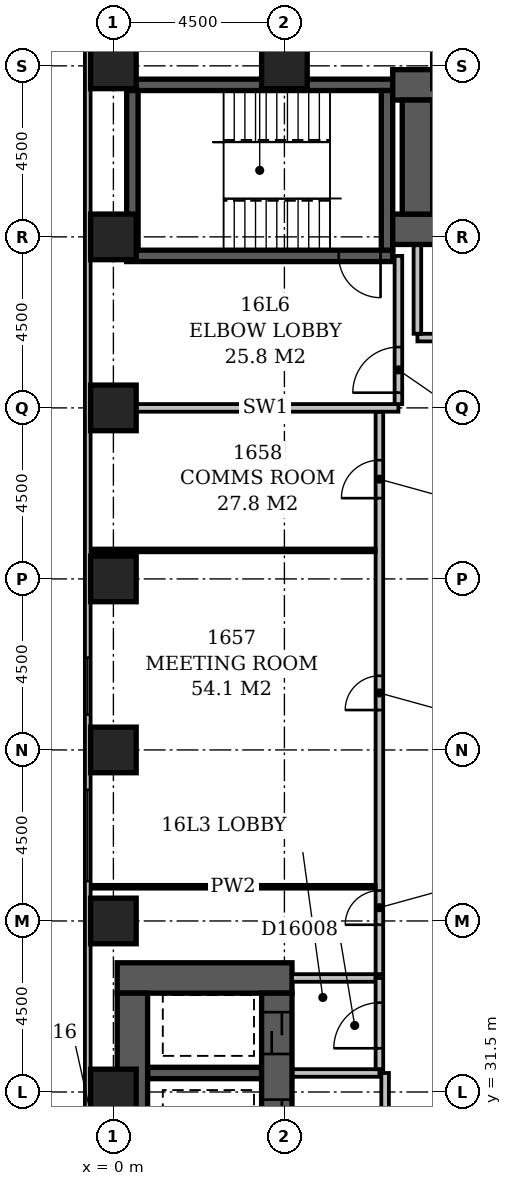
"""IFC4 building model, lengths in metres.
Left out: names, types, materials, properties, quantities, classifications, styles, units other than length and angle.
Written with IfcOpenShell. Run it as: python <this file> out.ifc"""

import sys

from ifc_helpers import new_model, si_unit, direction, frame, frame_2d, origin, origin_2d, place, context, subcontext, project, spatial, rectangle, extrude, element, fill, save


model = new_model("IFC4")
c1 = context("Model", 3, precision=1e-05, world=origin(), true_north=direction((0.0, 1.0)))
c2 = subcontext(c1, "Body", "Model", "MODEL_VIEW")
j1 = project(units=[si_unit("LENGTHUNIT", "METRE"), si_unit("PLANEANGLEUNIT", "RADIAN")], contexts=[c1])
p1 = place(None, origin())
s1 = spatial("IfcSite", under=j1, at=p1, CompositionType="ELEMENT")
p2 = place(p1, origin())
s2 = spatial("IfcBuilding", under=s1, at=p2, CompositionType="ELEMENT")
p3 = place(p2, frame((0.0, 0.0, 68.6)))
s3 = spatial("IfcBuildingStorey", under=s2, at=p3, CompositionType="ELEMENT", Elevation=68.6)
p4 = place(p3, frame((0.1, 34.5, -0.3), z_axis=(0.0, 0.0, 1.0), x_axis=(1.0, 0.0, 0.0)))
e1 = element("IfcWall", 1, at=p4, inside=s3, PredefinedType="SHEAR", context=c2, shape_type="SweptSolid", body=[
    extrude(rectangle(XDim=4.6, YDim=0.8, at=frame_2d((2.3, 0.0))), origin(), (0.0, 0.0, 1.0), 3.6),
])
p5 = place(p3, frame((0.35, 53.5, -0.3), z_axis=(0.0, 0.0, 1.0), x_axis=(1.0, 0.0, 0.0)))
e2 = element("IfcWall", 2, at=p5, inside=s3, PredefinedType="SHEAR", context=c2, shape_type="SweptSolid", body=[
    extrude(rectangle(XDim=7.0, YDim=0.3, at=frame_2d((3.5, 0.0))), origin(), (0.0, 0.0, 1.0), 3.6),
])
p6 = place(p5, frame((5.58, 0.0, 0.3)))
e3 = element("IfcOpeningElement", 3, at=p6, cuts=e2, PredefinedType="OPENING", context=c2, shape_type="SweptSolid", body=[
    extrude(rectangle(XDim=1.1, YDim=2.1, at=frame_2d((0.55, 1.05))), frame((0.0, 0.162, 0.0), z_axis=(0.0, -1.0, 0.0), x_axis=(1.0, 0.0, 0.0)), (0.0, 0.0, 1.0), 0.324),
])
p7 = place(p3, frame((0.35, 58.0, -0.3), z_axis=(0.0, 0.0, 1.0), x_axis=(1.0, 0.0, 0.0)))
e4 = element("IfcWall", 4, at=p7, inside=s3, PredefinedType="SHEAR", context=c2, shape_type="SweptSolid", body=[
    extrude(rectangle(XDim=7.0, YDim=0.3, at=frame_2d((3.5, 0.0))), origin(), (0.0, 0.0, 1.0), 3.6),
])
p8 = place(p3, frame((0.5, 27.15, -0.3), z_axis=(0.0, 0.0, 1.0), x_axis=(0.0, 1.0, 0.0)))
e5 = element("IfcWall", 5, at=p8, inside=s3, PredefinedType="SHEAR", context=c2, shape_type="SweptSolid", body=[
    extrude(rectangle(XDim=6.95, YDim=0.8, at=frame_2d((3.475, 0.0))), origin(), (0.0, 0.0, 1.0), 3.6),
])
p9 = place(p3, frame((0.5, 53.65, -0.3), z_axis=(0.0, 0.0, 1.0), x_axis=(0.0, 1.0, 0.0)))
e6 = element("IfcWall", 6, at=p9, inside=s3, PredefinedType="SHEAR", context=c2, shape_type="SweptSolid", body=[
    extrude(rectangle(XDim=4.2, YDim=0.3, at=frame_2d((2.1, 0.0))), origin(), (0.0, 0.0, 1.0), 3.6),
])
p10 = place(p3, frame((0.9, 32.0, -0.3), z_axis=(0.0, 0.0, 1.0), x_axis=(1.0, 0.0, 0.0)))
e7 = element("IfcWall", 7, at=p10, inside=s3, PredefinedType="SHEAR", context=c2, shape_type="SweptSolid", body=[
    extrude(rectangle(XDim=3.0, YDim=0.3, at=frame_2d((1.5, 0.0))), origin(), (0.0, 0.0, 1.0), 3.6),
])
p11 = place(p3, frame((4.3, 27.15, -0.3), z_axis=(0.0, 0.0, 1.0), x_axis=(0.0, 1.0, 0.0)))
e8 = element("IfcWall", 8, at=p11, inside=s3, PredefinedType="SHEAR", context=c2, shape_type="SweptSolid", body=[
    extrude(rectangle(XDim=6.95, YDim=0.8, at=frame_2d((3.475, 0.0))), origin(), (0.0, 0.0, 1.0), 3.6),
])
p12 = place(p11, frame((3.05, 0.0, 0.3)))
e9 = element("IfcOpeningElement", 9, at=p12, cuts=e8, PredefinedType="OPENING", context=c2, shape_type="SweptSolid", body=[
    extrude(rectangle(XDim=1.1, YDim=2.1, at=frame_2d((0.55, 1.05))), frame((0.0, 0.412, 0.0), z_axis=(0.0, -1.0, 0.0), x_axis=(1.0, 0.0, 0.0)), (0.0, 0.0, 1.0), 0.824),
])
p13 = place(p11, frame((0.55, 0.0, 0.3)))
e10 = element("IfcOpeningElement", 10, at=p13, cuts=e8, PredefinedType="OPENING", context=c2, shape_type="SweptSolid", body=[
    extrude(rectangle(XDim=1.1, YDim=2.1, at=frame_2d((0.55, 1.05))), frame((0.0, 0.412, 0.0), z_axis=(0.0, -1.0, 0.0), x_axis=(1.0, 0.0, 0.0)), (0.0, 0.0, 1.0), 0.824),
])
p14 = place(p11, frame((5.35, 0.0, 0.3)))
e11 = element("IfcOpeningElement", 11, at=p14, cuts=e8, PredefinedType="OPENING", context=c2, shape_type="SweptSolid", body=[
    extrude(rectangle(XDim=1.1, YDim=2.1, at=frame_2d((0.55, 1.05))), frame((0.0, 0.412, 0.0), z_axis=(0.0, -1.0, 0.0), x_axis=(1.0, 0.0, 0.0)), (0.0, 0.0, 1.0), 0.824),
])
p15 = place(p3, frame((7.2, 53.65, -0.3), z_axis=(0.0, 0.0, 1.0), x_axis=(0.0, 1.0, 0.0)))
e12 = element("IfcWall", 12, at=p15, inside=s3, PredefinedType="SHEAR", context=c2, shape_type="SweptSolid", body=[
    extrude(rectangle(XDim=4.2, YDim=0.3, at=frame_2d((2.1, 0.0))), origin(), (0.0, 0.0, 1.0), 3.6),
])
p16 = place(p3, frame((7.35, 54.2, -0.3), z_axis=(0.0, 0.0, 1.0), x_axis=(1.0, 0.0, 0.0)))
e13 = element("IfcWall", 13, at=p16, inside=s3, PredefinedType="SHEAR", context=c2, shape_type="SweptSolid", body=[
    extrude(rectangle(XDim=16.45, YDim=0.8, at=frame_2d((8.225, 0.0))), origin(), (0.0, 0.0, 1.0), 3.6),
])
p17 = place(p16, frame((1.35, 0.0, 0.3)))
e14 = element("IfcOpeningElement", 14, at=p17, cuts=e13, PredefinedType="OPENING", context=c2, shape_type="SweptSolid", body=[
    extrude(rectangle(XDim=1.1, YDim=2.1, at=frame_2d((0.55, 1.05))), frame((0.0, 0.412, 0.0), z_axis=(0.0, -1.0, 0.0), x_axis=(1.0, 0.0, 0.0)), (0.0, 0.0, 1.0), 0.824),
])
p18 = place(p16, frame((3.85, 0.0, 0.3)))
e15 = element("IfcOpeningElement", 15, at=p18, cuts=e13, PredefinedType="OPENING", context=c2, shape_type="SweptSolid", body=[
    extrude(rectangle(XDim=1.1, YDim=2.1, at=frame_2d((0.55, 1.05))), frame((0.0, 0.412, 0.0), z_axis=(0.0, -1.0, 0.0), x_axis=(1.0, 0.0, 0.0)), (0.0, 0.0, 1.0), 0.824),
])
p19 = place(p16, frame((6.35, 0.0, 0.3)))
e16 = element("IfcOpeningElement", 16, at=p19, cuts=e13, PredefinedType="OPENING", context=c2, shape_type="SweptSolid", body=[
    extrude(rectangle(XDim=1.1, YDim=2.1, at=frame_2d((0.55, 1.05))), frame((0.0, 0.412, 0.0), z_axis=(0.0, -1.0, 0.0), x_axis=(1.0, 0.0, 0.0)), (0.0, 0.0, 1.0), 0.824),
])
p20 = place(p16, frame((8.85, 0.0, 0.3)))
e17 = element("IfcOpeningElement", 17, at=p20, cuts=e13, PredefinedType="OPENING", context=c2, shape_type="SweptSolid", body=[
    extrude(rectangle(XDim=1.1, YDim=2.1, at=frame_2d((0.55, 1.05))), frame((0.0, 0.412, 0.0), z_axis=(0.0, -1.0, 0.0), x_axis=(1.0, 0.0, 0.0)), (0.0, 0.0, 1.0), 0.824),
])
p21 = place(p16, frame((11.35, 0.0, 0.3)))
e18 = element("IfcOpeningElement", 18, at=p21, cuts=e13, PredefinedType="OPENING", context=c2, shape_type="SweptSolid", body=[
    extrude(rectangle(XDim=1.1, YDim=2.1, at=frame_2d((0.55, 1.05))), frame((0.0, 0.412, 0.0), z_axis=(0.0, -1.0, 0.0), x_axis=(1.0, 0.0, 0.0)), (0.0, 0.0, 1.0), 0.824),
])
p22 = place(p16, frame((13.85, 0.0, 0.3)))
e19 = element("IfcOpeningElement", 19, at=p22, cuts=e13, PredefinedType="OPENING", context=c2, shape_type="SweptSolid", body=[
    extrude(rectangle(XDim=1.1, YDim=2.1, at=frame_2d((0.55, 1.05))), frame((0.0, 0.412, 0.0), z_axis=(0.0, -1.0, 0.0), x_axis=(1.0, 0.0, 0.0)), (0.0, 0.0, 1.0), 0.824),
])
p23 = place(p3, frame((7.35, 58.0, -0.3), z_axis=(0.0, 0.0, 1.0), x_axis=(1.0, 0.0, 0.0)))
e20 = element("IfcWall", 20, at=p23, inside=s3, PredefinedType="SHEAR", context=c2, shape_type="SweptSolid", body=[
    extrude(rectangle(XDim=16.45, YDim=0.8, at=frame_2d((8.225, 0.0))), origin(), (0.0, 0.0, 1.0), 3.6),
])
p24 = place(p3, frame((8.0, 54.6, -0.3), z_axis=(0.0, 0.0, 1.0), x_axis=(0.0, 1.0, 0.0)))
e21 = element("IfcWall", 21, at=p24, inside=s3, PredefinedType="SHEAR", context=c2, shape_type="SweptSolid", body=[
    extrude(rectangle(XDim=3.0, YDim=0.8, at=frame_2d((1.5, 0.0))), origin(), (0.0, 0.0, 1.0), 3.6),
])
for number, where, z_axis, x_axis in (
    (22, (0.0, 31.5, -0.3), (0.0, 0.0, 1.0), (1.0, 0.0, 0.0)),
    (23, (0.0, 36.0, -0.3), (0.0, 0.0, 1.0), (1.0, 0.0, 0.0)),
    (24, (0.0, 40.5, -0.3), (0.0, 0.0, 1.0), (1.0, 0.0, 0.0)),
    (25, (0.0, 45.0, -0.3), (0.0, 0.0, 1.0), (1.0, 0.0, 0.0)),
    (26, (0.0, 49.5, -0.3), (0.0, 0.0, 1.0), (1.0, 0.0, 0.0)),
    (27, (0.0, 54.0, -0.3), (0.0, 0.0, 1.0), (1.0, 0.0, 0.0)),
    (28, (0.0, 58.5, -0.3), (0.0, 0.0, 1.0), (1.0, 0.0, 0.0)),
    (29, (4.5, 58.5, -0.3), (0.0, 0.0, 1.0), (1.0, 0.0, 0.0)),
):
    element("IfcColumn", number, at=place(p3, frame(where, z_axis=z_axis, x_axis=x_axis)), inside=s3, PredefinedType="COLUMN", context=c2, shape_type="SweptSolid", body=[
        extrude(rectangle(XDim=1.2, YDim=1.2, at=origin_2d()), origin(), (0.0, 0.0, 1.0), 3.6),
    ])
p25 = place(p3, frame((-0.675, 59.1, 0.0), z_axis=(0.0, 0.0, 1.0), x_axis=(0.0, -1.0, 0.0)))
e30 = element("IfcWall", 30, at=p25, inside=s3, PredefinedType="STANDARD", context=c2, shape_type="SweptSolid", body=[
    extrude(rectangle(XDim=55.35, YDim=0.15, at=frame_2d((27.675, 0.0))), origin(), (0.0, 0.0, 1.0), 2.7),
])
p26 = place(p25, frame((16.17, 0.0, 0.6)))
e31 = element("IfcOpeningElement", 31, at=p26, cuts=e30, PredefinedType="OPENING", context=c2, shape_type="SweptSolid", body=[
    extrude(rectangle(XDim=1.5, YDim=1.8, at=frame_2d((0.75, 0.9))), frame((0.0, 0.087, 0.0), z_axis=(0.0, -1.0, 0.0), x_axis=(1.0, 0.0, 0.0)), (0.0, 0.0, 1.0), 0.174),
])
p27 = place(p25, frame((19.65, 0.0, 0.6)))
e32 = element("IfcOpeningElement", 32, at=p27, cuts=e30, PredefinedType="OPENING", context=c2, shape_type="SweptSolid", body=[
    extrude(rectangle(XDim=2.4, YDim=1.8, at=frame_2d((1.2, 0.9))), frame((0.0, 0.087, 0.0), z_axis=(0.0, -1.0, 0.0), x_axis=(1.0, 0.0, 0.0)), (0.0, 0.0, 1.0), 0.174),
])
p28 = place(p25, frame((43.17, 0.0, 0.6)))
e33 = element("IfcOpeningElement", 33, at=p28, cuts=e30, PredefinedType="OPENING", context=c2, shape_type="SweptSolid", body=[
    extrude(rectangle(XDim=1.5, YDim=1.8, at=frame_2d((0.75, 0.9))), frame((0.0, 0.087, 0.0), z_axis=(0.0, -1.0, 0.0), x_axis=(1.0, 0.0, 0.0)), (0.0, 0.0, 1.0), 0.174),
])
p29 = place(p3, frame((8.0, 51.35, 0.0), z_axis=(0.0, 0.0, 1.0), x_axis=(1.0, 0.0, 0.0)))
e34 = element("IfcWall", 34, at=p29, inside=s3, PredefinedType="PARTITIONING", context=c2, shape_type="SweptSolid", body=[
    extrude(rectangle(XDim=15.0, YDim=0.2, at=frame_2d((7.5, 0.0))), origin(), (0.0, 0.0, 1.0), 3.3),
])
p30 = place(p29, frame((3.4, 0.0, 0.0)))
e35 = element("IfcOpeningElement", 35, at=p30, cuts=e34, PredefinedType="OPENING", context=c2, shape_type="SweptSolid", body=[
    extrude(rectangle(XDim=1.2, YDim=2.1, at=frame_2d((0.6, 1.05))), frame((0.0, 0.112, 0.0), z_axis=(0.0, -1.0, 0.0), x_axis=(1.0, 0.0, 0.0)), (0.0, 0.0, 1.0), 0.224),
])
p31 = place(p29, frame((9.4, 0.0, 0.0)))
e36 = element("IfcOpeningElement", 36, at=p31, cuts=e34, PredefinedType="OPENING", context=c2, shape_type="SweptSolid", body=[
    extrude(rectangle(XDim=1.2, YDim=2.1, at=frame_2d((0.6, 1.05))), frame((0.0, 0.112, 0.0), z_axis=(0.0, -1.0, 0.0), x_axis=(1.0, 0.0, 0.0)), (0.0, 0.0, 1.0), 0.224),
])
p32 = place(p3, frame((8.0, 51.45, 0.0), z_axis=(0.0, 0.0, 1.0), x_axis=(0.0, 1.0, 0.0)))
e37 = element("IfcWall", 37, at=p32, inside=s3, PredefinedType="PARTITIONING", context=c2, shape_type="SweptSolid", body=[
    extrude(rectangle(XDim=2.33, YDim=0.2, at=frame_2d((1.165, 0.0))), origin(), (0.0, 0.0, 1.0), 3.3),
])
p33 = place(p3, frame((4.72, 32.0, 0.0), z_axis=(0.0, 0.0, 1.0), x_axis=(1.0, 0.0, 0.0)))
e38 = element("IfcWall", 38, at=p33, inside=s3, PredefinedType="PARTITIONING", context=c2, shape_type="SweptSolid", body=[
    extrude(rectangle(XDim=2.28, YDim=0.2, at=frame_2d((1.14, 0.0))), origin(), (0.0, 0.0, 1.0), 3.3),
])
p34 = place(p3, frame((7.0, 32.1, 0.0), z_axis=(0.0, 0.0, 1.0), x_axis=(0.0, 1.0, 0.0)))
e39 = element("IfcWall", 39, at=p34, inside=s3, PredefinedType="PARTITIONING", context=c2, shape_type="SweptSolid", body=[
    extrude(rectangle(XDim=2.4, YDim=0.2, at=frame_2d((1.2, 0.0))), origin(), (0.0, 0.0, 1.0), 3.3),
])
p35 = place(p34, frame((0.55, 0.0, 0.0)))
e40 = element("IfcOpeningElement", 40, at=p35, cuts=e39, PredefinedType="OPENING", context=c2, shape_type="SweptSolid", body=[
    extrude(rectangle(XDim=1.2, YDim=2.1, at=frame_2d((0.6, 1.05))), frame((0.0, 0.112, 0.0), z_axis=(0.0, -1.0, 0.0), x_axis=(1.0, 0.0, 0.0)), (0.0, 0.0, 1.0), 0.224),
])
p36 = place(p3, frame((4.7, 34.5, 0.0), z_axis=(0.0, 0.0, 1.0), x_axis=(1.0, 0.0, 0.0)))
e41 = element("IfcWall", 41, at=p36, inside=s3, PredefinedType="PARTITIONING", context=c2, shape_type="SweptSolid", body=[
    extrude(rectangle(XDim=2.2, YDim=0.2, at=frame_2d((1.1, 0.0))), origin(), (0.0, 0.0, 1.0), 3.3),
])
p37 = place(p3, frame((7.15, 27.17, 0.0), z_axis=(0.0, 0.0, 1.0), x_axis=(0.0, 1.0, 0.0)))
e42 = element("IfcWall", 42, at=p37, inside=s3, PredefinedType="PARTITIONING", context=c2, shape_type="SweptSolid", body=[
    extrude(rectangle(XDim=4.83, YDim=0.2, at=frame_2d((2.415, 0.0))), origin(), (0.0, 0.0, 1.0), 3.3),
])
p38 = place(p37, frame((1.73, 0.0, 0.0)))
e43 = element("IfcOpeningElement", 43, at=p38, cuts=e42, PredefinedType="OPENING", context=c2, shape_type="SweptSolid", body=[
    extrude(rectangle(XDim=1.2, YDim=2.1, at=frame_2d((0.6, 1.05))), frame((0.0, 0.112, 0.0), z_axis=(0.0, -1.0, 0.0), x_axis=(1.0, 0.0, 0.0)), (0.0, 0.0, 1.0), 0.224),
])
p39 = place(p3, frame((0.5, 49.5, 0.0), z_axis=(0.0, 0.0, 1.0), x_axis=(1.0, 0.0, 0.0)))
e44 = element("IfcWall", 44, at=p39, inside=s3, PredefinedType="PARTITIONING", context=c2, shape_type="SweptSolid", body=[
    extrude(rectangle(XDim=7.0, YDim=0.2, at=frame_2d((3.5, 0.0))), origin(), (0.0, 0.0, 1.0), 3.3),
])
p40 = place(p3, frame((7.5, 49.6, 0.0), z_axis=(0.0, 0.0, 1.0), x_axis=(0.0, 1.0, 0.0)))
e45 = element("IfcWall", 45, at=p40, inside=s3, PredefinedType="PARTITIONING", context=c2, shape_type="SweptSolid", body=[
    extrude(rectangle(XDim=3.9, YDim=0.2, at=frame_2d((1.95, 0.0))), origin(), (0.0, 0.0, 1.0), 3.3),
])
p41 = place(p40, frame((0.3, 0.0, 0.0)))
e46 = element("IfcOpeningElement", 46, at=p41, cuts=e45, PredefinedType="OPENING", context=c2, shape_type="SweptSolid", body=[
    extrude(rectangle(XDim=1.2, YDim=2.1, at=frame_2d((0.6, 1.05))), frame((0.0, 0.112, 0.0), z_axis=(0.0, -1.0, 0.0), x_axis=(1.0, 0.0, 0.0)), (0.0, 0.0, 1.0), 0.224),
])
p42 = place(p3, frame((7.0, 34.6, 0.0), z_axis=(0.0, 0.0, 1.0), x_axis=(0.0, 1.0, 0.0)))
e47 = element("IfcWall", 47, at=p42, inside=s3, PredefinedType="PARTITIONING", context=c2, shape_type="SweptSolid", body=[
    extrude(rectangle(XDim=14.8, YDim=0.2, at=frame_2d((7.4, 0.0))), origin(), (0.0, 0.0, 1.0), 3.3),
])
p43 = place(p42, frame((1.3, 0.0, 0.0)))
e48 = element("IfcOpeningElement", 48, at=p43, cuts=e47, PredefinedType="OPENING", context=c2, shape_type="SweptSolid", body=[
    extrude(rectangle(XDim=0.9, YDim=2.1, at=frame_2d((0.45, 1.05))), frame((0.0, 0.112, 0.0), z_axis=(0.0, -1.0, 0.0), x_axis=(1.0, 0.0, 0.0)), (0.0, 0.0, 1.0), 0.224),
])
p44 = place(p42, frame((6.95, 0.0, 0.0)))
e49 = element("IfcOpeningElement", 49, at=p44, cuts=e47, PredefinedType="OPENING", context=c2, shape_type="SweptSolid", body=[
    extrude(rectangle(XDim=0.9, YDim=2.1, at=frame_2d((0.45, 1.05))), frame((0.0, 0.112, 0.0), z_axis=(0.0, -1.0, 0.0), x_axis=(1.0, 0.0, 0.0)), (0.0, 0.0, 1.0), 0.224),
])
p45 = place(p42, frame((12.525, 0.0, 0.0)))
e50 = element("IfcOpeningElement", 50, at=p45, cuts=e47, PredefinedType="OPENING", context=c2, shape_type="SweptSolid", body=[
    extrude(rectangle(XDim=1.0, YDim=2.1, at=frame_2d((0.5, 1.05))), frame((0.0, 0.112, 0.0), z_axis=(0.0, -1.0, 0.0), x_axis=(1.0, 0.0, 0.0)), (0.0, 0.0, 1.0), 0.224),
])
for number, where, z_axis, x_axis in (
    (51, (-0.6, 36.9, 0.0), (0.0, 0.0, 1.0), (1.0, 0.0, 0.0)),
    (52, (-0.6, 45.75, 0.0), (0.0, 0.0, 1.0), (1.0, 0.0, 0.0)),
):
    element("IfcWall", number, at=place(p3, frame(where, z_axis=z_axis, x_axis=x_axis)), inside=s3, PredefinedType="PARTITIONING", context=c2, shape_type="SweptSolid", body=[
        extrude(rectangle(XDim=7.5, YDim=0.1, at=frame_2d((3.75, 0.0))), origin(), (0.0, 0.0, 1.0), 3.3),
    ])
p46 = place(p26, origin())
e53 = element("IfcWindow", 53, at=p46, inside=s3, PartitioningType="SINGLE_PANEL", PredefinedType="WINDOW", context=c2, shape_type="SweptSolid", body=[
    extrude(rectangle(XDim=1.5, YDim=1.8, at=frame_2d((0.75, 0.9))), frame((0.0, 0.03, 0.0), z_axis=(0.0, -1.0, 0.0), x_axis=(1.0, 0.0, 0.0)), (0.0, 0.0, 1.0), 0.06),
])
fill(e31, e53)
p47 = place(p27, origin())
e54 = element("IfcWindow", 54, at=p47, inside=s3, PartitioningType="SINGLE_PANEL", PredefinedType="WINDOW", context=c2, shape_type="SweptSolid", body=[
    extrude(rectangle(XDim=2.4, YDim=1.8, at=frame_2d((1.2, 0.9))), frame((0.0, 0.03, 0.0), z_axis=(0.0, -1.0, 0.0), x_axis=(1.0, 0.0, 0.0)), (0.0, 0.0, 1.0), 0.06),
])
fill(e32, e54)
p48 = place(p41, origin())
e55 = element("IfcDoor", 55, at=p48, inside=s3, OperationType="SINGLE_SWING_LEFT", PredefinedType="DOOR", context=c2, shape_type="SweptSolid", body=[
    extrude(rectangle(XDim=1.2, YDim=2.1, at=frame_2d((0.6, 1.05))), frame((0.0, 0.025, 0.0), z_axis=(0.0, -1.0, 0.0), x_axis=(1.0, 0.0, 0.0)), (0.0, 0.0, 1.0), 0.05),
])
fill(e46, e55)
p49 = place(p12, origin())
e56 = element("IfcDoor", 56, at=p49, inside=s3, OperationType="SLIDING_TO_LEFT", PredefinedType="DOOR", context=c2, shape_type="SweptSolid", body=[
    extrude(rectangle(XDim=1.1, YDim=2.1, at=frame_2d((0.55, 1.05))), frame((0.0, 0.025, 0.0), z_axis=(0.0, -1.0, 0.0), x_axis=(1.0, 0.0, 0.0)), (0.0, 0.0, 1.0), 0.05),
])
fill(e9, e56)
p50 = place(p35, origin())
e57 = element("IfcDoor", 57, at=p50, inside=s3, OperationType="SINGLE_SWING_LEFT", PredefinedType="DOOR", context=c2, shape_type="SweptSolid", body=[
    extrude(rectangle(XDim=1.2, YDim=2.1, at=frame_2d((0.6, 1.05))), frame((0.0, 0.025, 0.0), z_axis=(0.0, -1.0, 0.0), x_axis=(1.0, 0.0, 0.0)), (0.0, 0.0, 1.0), 0.05),
])
fill(e40, e57)
p51 = place(p14, origin())
e58 = element("IfcDoor", 58, at=p51, inside=s3, OperationType="SLIDING_TO_LEFT", PredefinedType="DOOR", context=c2, shape_type="SweptSolid", body=[
    extrude(rectangle(XDim=1.1, YDim=2.1, at=frame_2d((0.55, 1.05))), frame((0.0, 0.025, 0.0), z_axis=(0.0, -1.0, 0.0), x_axis=(1.0, 0.0, 0.0)), (0.0, 0.0, 1.0), 0.05),
])
fill(e11, e58)
p52 = place(p6, origin())
e59 = element("IfcDoor", 59, at=p52, inside=s3, OperationType="SINGLE_SWING_RIGHT", PredefinedType="DOOR", context=c2, shape_type="SweptSolid", body=[
    extrude(rectangle(XDim=1.1, YDim=2.1, at=frame_2d((0.55, 1.05))), frame((0.0, 0.025, 0.0), z_axis=(0.0, -1.0, 0.0), x_axis=(1.0, 0.0, 0.0)), (0.0, 0.0, 1.0), 0.05),
])
fill(e3, e59)
p53 = place(p43, origin())
e60 = element("IfcDoor", 60, at=p53, inside=s3, OperationType="SINGLE_SWING_LEFT", PredefinedType="DOOR", context=c2, shape_type="SweptSolid", body=[
    extrude(rectangle(XDim=0.9, YDim=2.1, at=frame_2d((0.45, 1.05))), frame((0.0, 0.025, 0.0), z_axis=(0.0, -1.0, 0.0), x_axis=(1.0, 0.0, 0.0)), (0.0, 0.0, 1.0), 0.05),
])
fill(e48, e60)
p54 = place(p44, origin())
e61 = element("IfcDoor", 61, at=p54, inside=s3, OperationType="SINGLE_SWING_LEFT", PredefinedType="DOOR", context=c2, shape_type="SweptSolid", body=[
    extrude(rectangle(XDim=0.9, YDim=2.1, at=frame_2d((0.45, 1.05))), frame((0.0, 0.025, 0.0), z_axis=(0.0, -1.0, 0.0), x_axis=(1.0, 0.0, 0.0)), (0.0, 0.0, 1.0), 0.05),
])
fill(e49, e61)
p55 = place(p45, origin())
e62 = element("IfcDoor", 62, at=p55, inside=s3, OperationType="SINGLE_SWING_LEFT", PredefinedType="DOOR", context=c2, shape_type="SweptSolid", body=[
    extrude(rectangle(XDim=1.0, YDim=2.1, at=frame_2d((0.5, 1.05))), frame((0.0, 0.025, 0.0), z_axis=(0.0, -1.0, 0.0), x_axis=(1.0, 0.0, 0.0)), (0.0, 0.0, 1.0), 0.05),
])
fill(e50, e62)
save(model, sys.argv[1])
